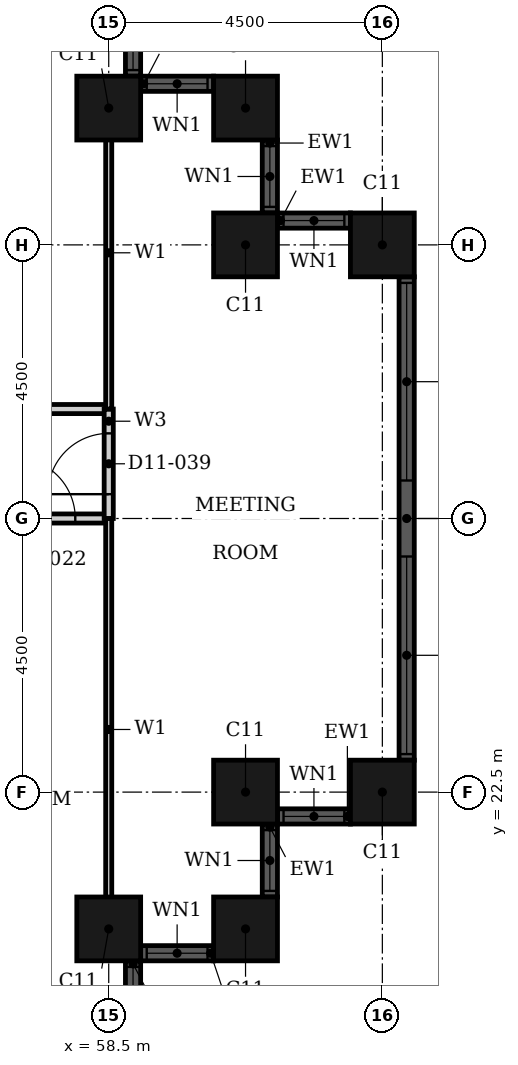
"""IFC4 building model, lengths in metres.
Left out: names, types, materials, properties, quantities, classifications, styles, units other than length and angle.
Written with IfcOpenShell. Run it as: python <this file> out.ifc"""

import sys

from ifc_helpers import new_model, si_unit, direction, frame, frame_2d, origin, origin_2d, place, context, subcontext, project, spatial, rectangle, hollow_rectangle, extrude, element, fill, save


model = new_model("IFC4")
c1 = context("Model", 3, precision=1e-05, world=origin(), true_north=direction((0.0, 1.0)))
c2 = subcontext(c1, "Body", "Model", "MODEL_VIEW")
j1 = project(units=[si_unit("LENGTHUNIT", "METRE"), si_unit("PLANEANGLEUNIT", "RADIAN")], contexts=[c1])
p1 = place(None, origin())
s1 = spatial("IfcSite", under=j1, at=p1, CompositionType="ELEMENT")
p2 = place(p1, origin())
s2 = spatial("IfcBuilding", under=s1, at=p2, CompositionType="ELEMENT")
p3 = place(p2, frame((0.0, 0.0, 52.8)))
s3 = spatial("IfcBuildingStorey", under=s2, at=p3, CompositionType="ELEMENT", Elevation=52.8)
for number, where, z_axis, x_axis in (
    (1, (58.5, 20.25, 0.0), (0.0, 0.0, 1.0), (1.0, 0.0, 0.0)),
    (2, (60.75, 20.25, 0.0), (0.0, 0.0, 1.0), (1.0, 0.0, 0.0)),
    (3, (60.75, 22.5, 0.0), (0.0, 0.0, 1.0), (1.0, 0.0, 0.0)),
    (4, (63.0, 22.5, 0.0), (0.0, 0.0, 1.0), (1.0, 0.0, 0.0)),
    (5, (63.0, 31.5, 0.0), (0.0, 0.0, 1.0), (1.0, 0.0, 0.0)),
    (6, (60.75, 31.5, 0.0), (0.0, 0.0, 1.0), (1.0, 0.0, 0.0)),
    (7, (60.75, 33.75, 0.0), (0.0, 0.0, 1.0), (1.0, 0.0, 0.0)),
    (8, (58.5, 33.75, 0.0), (0.0, 0.0, 1.0), (1.0, 0.0, 0.0)),
):
    element("IfcColumn", number, at=place(p3, frame(where, z_axis=z_axis, x_axis=x_axis)), inside=s3, PredefinedType="COLUMN", context=c2, shape_type="SweptSolid", body=[
        extrude(hollow_rectangle(XDim=1.05, YDim=1.05, WallThickness=0.034, at=origin_2d()), origin(), (0.0, 0.0, 1.0), 3.6),
    ])
p4 = place(p3, frame((58.9, 18.525, 0.0), z_axis=(0.0, 0.0, 1.0), x_axis=(0.0, 1.0, 0.0)))
e9 = element("IfcWall", 9, at=p4, inside=s3, PredefinedType="SOLIDWALL", context=c2, shape_type="SweptSolid", body=[
    extrude(rectangle(XDim=1.2, YDim=0.25, at=frame_2d((0.6, 0.0))), origin(), (0.0, 0.0, 1.0), 3.6),
])
p5 = place(p4, frame((0.1, 0.0, 0.9)))
e10 = element("IfcOpeningElement", 10, at=p5, cuts=e9, PredefinedType="OPENING", context=c2, shape_type="SweptSolid", body=[
    extrude(rectangle(XDim=1.0, YDim=2.08, at=frame_2d((0.5, 1.04))), frame((0.0, 0.135, 0.0), z_axis=(0.0, -1.0, 0.0), x_axis=(1.0, 0.0, 0.0)), (0.0, 0.0, 1.0), 0.27),
])
p6 = place(p3, frame((59.025, 19.85, 0.0), z_axis=(0.0, 0.0, 1.0), x_axis=(1.0, 0.0, 0.0)))
e11 = element("IfcWall", 11, at=p6, inside=s3, PredefinedType="SOLIDWALL", context=c2, shape_type="SweptSolid", body=[
    extrude(rectangle(XDim=1.2, YDim=0.25, at=frame_2d((0.6, 0.0))), origin(), (0.0, 0.0, 1.0), 3.6),
])
p7 = place(p6, frame((0.1, 0.0, 0.9)))
e12 = element("IfcOpeningElement", 12, at=p7, cuts=e11, PredefinedType="OPENING", context=c2, shape_type="SweptSolid", body=[
    extrude(rectangle(XDim=1.0, YDim=2.08, at=frame_2d((0.5, 1.04))), frame((0.0, 0.135, 0.0), z_axis=(0.0, -1.0, 0.0), x_axis=(1.0, 0.0, 0.0)), (0.0, 0.0, 1.0), 0.27),
])
p8 = place(p3, frame((61.15, 20.775, 0.0), z_axis=(0.0, 0.0, 1.0), x_axis=(0.0, 1.0, 0.0)))
e13 = element("IfcWall", 13, at=p8, inside=s3, PredefinedType="SOLIDWALL", context=c2, shape_type="SweptSolid", body=[
    extrude(rectangle(XDim=1.2, YDim=0.25, at=frame_2d((0.6, 0.0))), origin(), (0.0, 0.0, 1.0), 3.6),
])
p9 = place(p8, frame((0.1, 0.0, 0.9)))
e14 = element("IfcOpeningElement", 14, at=p9, cuts=e13, PredefinedType="OPENING", context=c2, shape_type="SweptSolid", body=[
    extrude(rectangle(XDim=1.0, YDim=2.08, at=frame_2d((0.5, 1.04))), frame((0.0, 0.135, 0.0), z_axis=(0.0, -1.0, 0.0), x_axis=(1.0, 0.0, 0.0)), (0.0, 0.0, 1.0), 0.27),
])
p10 = place(p3, frame((61.275, 22.1, 0.0), z_axis=(0.0, 0.0, 1.0), x_axis=(1.0, 0.0, 0.0)))
e15 = element("IfcWall", 15, at=p10, inside=s3, PredefinedType="SOLIDWALL", context=c2, shape_type="SweptSolid", body=[
    extrude(rectangle(XDim=1.2, YDim=0.25, at=frame_2d((0.6, 0.0))), origin(), (0.0, 0.0, 1.0), 3.6),
])
p11 = place(p10, frame((0.1, 0.0, 0.9)))
e16 = element("IfcOpeningElement", 16, at=p11, cuts=e15, PredefinedType="OPENING", context=c2, shape_type="SweptSolid", body=[
    extrude(rectangle(XDim=1.0, YDim=2.08, at=frame_2d((0.5, 1.04))), frame((0.0, 0.135, 0.0), z_axis=(0.0, -1.0, 0.0), x_axis=(1.0, 0.0, 0.0)), (0.0, 0.0, 1.0), 0.27),
])
p12 = place(p3, frame((63.4, 23.025, 0.0), z_axis=(0.0, 0.0, 1.0), x_axis=(0.0, 1.0, 0.0)))
e17 = element("IfcWall", 17, at=p12, inside=s3, PredefinedType="SOLIDWALL", context=c2, shape_type="SweptSolid", body=[
    extrude(rectangle(XDim=7.95, YDim=0.25, at=frame_2d((3.975, 0.0))), origin(), (0.0, 0.0, 1.0), 3.6),
])
p13 = place(p12, frame((0.1, 0.0, 0.9)))
e18 = element("IfcOpeningElement", 18, at=p13, cuts=e17, PredefinedType="OPENING", context=c2, shape_type="SweptSolid", body=[
    extrude(rectangle(XDim=3.25, YDim=2.08, at=frame_2d((1.625, 1.04))), frame((0.0, 0.135, 0.0), z_axis=(0.0, -1.0, 0.0), x_axis=(1.0, 0.0, 0.0)), (0.0, 0.0, 1.0), 0.27),
])
p14 = place(p12, frame((4.6, 0.0, 0.9)))
e19 = element("IfcOpeningElement", 19, at=p14, cuts=e17, PredefinedType="OPENING", context=c2, shape_type="SweptSolid", body=[
    extrude(rectangle(XDim=3.25, YDim=2.08, at=frame_2d((1.625, 1.04))), frame((0.0, 0.135, 0.0), z_axis=(0.0, -1.0, 0.0), x_axis=(1.0, 0.0, 0.0)), (0.0, 0.0, 1.0), 0.27),
])
p15 = place(p3, frame((62.475, 31.9, 0.0), z_axis=(0.0, 0.0, 1.0), x_axis=(-1.0, 0.0, 0.0)))
e20 = element("IfcWall", 20, at=p15, inside=s3, PredefinedType="SOLIDWALL", context=c2, shape_type="SweptSolid", body=[
    extrude(rectangle(XDim=1.2, YDim=0.25, at=frame_2d((0.6, 0.0))), origin(), (0.0, 0.0, 1.0), 3.6),
])
p16 = place(p15, frame((0.1, 0.0, 0.9)))
e21 = element("IfcOpeningElement", 21, at=p16, cuts=e20, PredefinedType="OPENING", context=c2, shape_type="SweptSolid", body=[
    extrude(rectangle(XDim=1.0, YDim=2.08, at=frame_2d((0.5, 1.04))), frame((0.0, 0.135, 0.0), z_axis=(0.0, -1.0, 0.0), x_axis=(1.0, 0.0, 0.0)), (0.0, 0.0, 1.0), 0.27),
])
p17 = place(p3, frame((61.15, 32.025, 0.0), z_axis=(0.0, 0.0, 1.0), x_axis=(0.0, 1.0, 0.0)))
e22 = element("IfcWall", 22, at=p17, inside=s3, PredefinedType="SOLIDWALL", context=c2, shape_type="SweptSolid", body=[
    extrude(rectangle(XDim=1.2, YDim=0.25, at=frame_2d((0.6, 0.0))), origin(), (0.0, 0.0, 1.0), 3.6),
])
p18 = place(p17, frame((0.1, 0.0, 0.9)))
e23 = element("IfcOpeningElement", 23, at=p18, cuts=e22, PredefinedType="OPENING", context=c2, shape_type="SweptSolid", body=[
    extrude(rectangle(XDim=1.0, YDim=2.08, at=frame_2d((0.5, 1.04))), frame((0.0, 0.135, 0.0), z_axis=(0.0, -1.0, 0.0), x_axis=(1.0, 0.0, 0.0)), (0.0, 0.0, 1.0), 0.27),
])
p19 = place(p3, frame((60.225, 34.15, 0.0), z_axis=(0.0, 0.0, 1.0), x_axis=(-1.0, 0.0, 0.0)))
e24 = element("IfcWall", 24, at=p19, inside=s3, PredefinedType="SOLIDWALL", context=c2, shape_type="SweptSolid", body=[
    extrude(rectangle(XDim=1.2, YDim=0.25, at=frame_2d((0.6, 0.0))), origin(), (0.0, 0.0, 1.0), 3.6),
])
p20 = place(p19, frame((0.1, 0.0, 0.9)))
e25 = element("IfcOpeningElement", 25, at=p20, cuts=e24, PredefinedType="OPENING", context=c2, shape_type="SweptSolid", body=[
    extrude(rectangle(XDim=1.0, YDim=2.08, at=frame_2d((0.5, 1.04))), frame((0.0, 0.135, 0.0), z_axis=(0.0, -1.0, 0.0), x_axis=(1.0, 0.0, 0.0)), (0.0, 0.0, 1.0), 0.27),
])
p21 = place(p3, frame((58.9, 34.275, 0.0), z_axis=(0.0, 0.0, 1.0), x_axis=(0.0, 1.0, 0.0)))
e26 = element("IfcWall", 26, at=p21, inside=s3, PredefinedType="SOLIDWALL", context=c2, shape_type="SweptSolid", body=[
    extrude(rectangle(XDim=1.2, YDim=0.25, at=frame_2d((0.6, 0.0))), origin(), (0.0, 0.0, 1.0), 3.6),
])
p22 = place(p21, frame((0.1, 0.0, 0.9)))
e27 = element("IfcOpeningElement", 27, at=p22, cuts=e26, PredefinedType="OPENING", context=c2, shape_type="SweptSolid", body=[
    extrude(rectangle(XDim=1.0, YDim=2.08, at=frame_2d((0.5, 1.04))), frame((0.0, 0.135, 0.0), z_axis=(0.0, -1.0, 0.0), x_axis=(1.0, 0.0, 0.0)), (0.0, 0.0, 1.0), 0.27),
])
p23 = place(p3, frame((46.8, 27.0, 0.0), z_axis=(0.0, 0.0, 1.0), x_axis=(1.0, 0.0, 0.0)))
e28 = element("IfcWall", 28, at=p23, inside=s3, PredefinedType="PARTITIONING", context=c2, shape_type="SweptSolid", body=[
    extrude(rectangle(XDim=11.7, YDim=0.15, at=frame_2d((5.85, 0.0))), origin(), (0.0, 0.0, 1.0), 2.58),
])
p24 = place(p23, frame((5.65, 0.0, 0.0)))
e29 = element("IfcOpeningElement", 29, at=p24, cuts=e28, PredefinedType="OPENING", context=c2, shape_type="SweptSolid", body=[
    extrude(rectangle(XDim=1.0, YDim=2.1, at=frame_2d((0.5, 1.05))), frame((0.0, 0.085, 0.0), z_axis=(0.0, -1.0, 0.0), x_axis=(1.0, 0.0, 0.0)), (0.0, 0.0, 1.0), 0.17),
])
p25 = place(p23, frame((10.15, 0.0, 0.0)))
e30 = element("IfcOpeningElement", 30, at=p25, cuts=e28, PredefinedType="OPENING", context=c2, shape_type="SweptSolid", body=[
    extrude(rectangle(XDim=1.0, YDim=2.1, at=frame_2d((0.5, 1.05))), frame((0.0, 0.085, 0.0), z_axis=(0.0, -1.0, 0.0), x_axis=(1.0, 0.0, 0.0)), (0.0, 0.0, 1.0), 0.17),
])
p26 = place(p3, frame((46.8, 28.8, 0.0), z_axis=(0.0, 0.0, 1.0), x_axis=(1.0, 0.0, 0.0)))
e31 = element("IfcWall", 31, at=p26, inside=s3, PredefinedType="PARTITIONING", context=c2, shape_type="SweptSolid", body=[
    extrude(rectangle(XDim=11.7, YDim=0.15, at=frame_2d((5.85, 0.0))), origin(), (0.0, 0.0, 1.0), 3.3),
])
p27 = place(p26, frame((4.45, 0.0, 0.0)))
e32 = element("IfcOpeningElement", 32, at=p27, cuts=e31, PredefinedType="OPENING", context=c2, shape_type="SweptSolid", body=[
    extrude(rectangle(XDim=1.0, YDim=2.1, at=frame_2d((0.5, 1.05))), frame((0.0, 0.085, 0.0), z_axis=(0.0, -1.0, 0.0), x_axis=(1.0, 0.0, 0.0)), (0.0, 0.0, 1.0), 0.17),
])
p28 = place(p3, frame((58.5, 27.0, 0.0), z_axis=(0.0, 0.0, 1.0), x_axis=(0.0, 1.0, 0.0)))
e33 = element("IfcWall", 33, at=p28, inside=s3, PredefinedType="PARTITIONING", context=c2, shape_type="SweptSolid", body=[
    extrude(rectangle(XDim=1.8, YDim=0.15, at=frame_2d((0.9, 0.0))), origin(), (0.0, 0.0, 1.0), 3.3),
])
p29 = place(p28, frame((0.4, 0.0, 0.0)))
e34 = element("IfcOpeningElement", 34, at=p29, cuts=e33, PredefinedType="OPENING", context=c2, shape_type="SweptSolid", body=[
    extrude(rectangle(XDim=1.0, YDim=2.1, at=frame_2d((0.5, 1.05))), frame((0.0, 0.085, 0.0), z_axis=(0.0, -1.0, 0.0), x_axis=(1.0, 0.0, 0.0)), (0.0, 0.0, 1.0), 0.17),
])
p30 = place(p3, frame((58.5, 20.06, 0.0), z_axis=(0.0, 0.0, 1.0), x_axis=(0.0, 1.0, 0.0)))
e35 = element("IfcWall", 35, at=p30, inside=s3, PredefinedType="PARTITIONING", context=c2, shape_type="SweptSolid", body=[
    extrude(rectangle(XDim=6.94, YDim=0.1, at=frame_2d((3.47, 0.0))), origin(), (0.0, 0.0, 1.0), 3.3),
])
p31 = place(p3, frame((58.5, 28.8, 0.0), z_axis=(0.0, 0.0, 1.0), x_axis=(0.0, 1.0, 0.0)))
e36 = element("IfcWall", 36, at=p31, inside=s3, PredefinedType="PARTITIONING", context=c2, shape_type="SweptSolid", body=[
    extrude(rectangle(XDim=5.14, YDim=0.1, at=frame_2d((2.57, 0.0))), origin(), (0.0, 0.0, 1.0), 3.3),
])
p32 = place(p5, origin())
e37 = element("IfcWindow", 37, at=p32, inside=s3, PartitioningType="SINGLE_PANEL", PredefinedType="WINDOW", context=c2, shape_type="SweptSolid", body=[
    extrude(rectangle(XDim=1.0, YDim=2.08, at=frame_2d((0.5, 1.04))), frame((0.0, 0.03, 0.0), z_axis=(0.0, -1.0, 0.0), x_axis=(1.0, 0.0, 0.0)), (0.0, 0.0, 1.0), 0.06),
])
fill(e10, e37)
p33 = place(p7, origin())
e38 = element("IfcWindow", 38, at=p33, inside=s3, PartitioningType="SINGLE_PANEL", PredefinedType="WINDOW", context=c2, shape_type="SweptSolid", body=[
    extrude(rectangle(XDim=1.0, YDim=2.08, at=frame_2d((0.5, 1.04))), frame((0.0, 0.03, 0.0), z_axis=(0.0, -1.0, 0.0), x_axis=(1.0, 0.0, 0.0)), (0.0, 0.0, 1.0), 0.06),
])
fill(e12, e38)
p34 = place(p9, origin())
e39 = element("IfcWindow", 39, at=p34, inside=s3, PartitioningType="SINGLE_PANEL", PredefinedType="WINDOW", context=c2, shape_type="SweptSolid", body=[
    extrude(rectangle(XDim=1.0, YDim=2.08, at=frame_2d((0.5, 1.04))), frame((0.0, 0.03, 0.0), z_axis=(0.0, -1.0, 0.0), x_axis=(1.0, 0.0, 0.0)), (0.0, 0.0, 1.0), 0.06),
])
fill(e14, e39)
p35 = place(p11, origin())
e40 = element("IfcWindow", 40, at=p35, inside=s3, PartitioningType="SINGLE_PANEL", PredefinedType="WINDOW", context=c2, shape_type="SweptSolid", body=[
    extrude(rectangle(XDim=1.0, YDim=2.08, at=frame_2d((0.5, 1.04))), frame((0.0, 0.03, 0.0), z_axis=(0.0, -1.0, 0.0), x_axis=(1.0, 0.0, 0.0)), (0.0, 0.0, 1.0), 0.06),
])
fill(e16, e40)
p36 = place(p13, origin())
e41 = element("IfcWindow", 41, at=p36, inside=s3, PartitioningType="SINGLE_PANEL", PredefinedType="WINDOW", context=c2, shape_type="SweptSolid", body=[
    extrude(rectangle(XDim=3.25, YDim=2.08, at=frame_2d((1.625, 1.04))), frame((0.0, 0.03, 0.0), z_axis=(0.0, -1.0, 0.0), x_axis=(1.0, 0.0, 0.0)), (0.0, 0.0, 1.0), 0.06),
])
fill(e18, e41)
p37 = place(p14, origin())
e42 = element("IfcWindow", 42, at=p37, inside=s3, PartitioningType="SINGLE_PANEL", PredefinedType="WINDOW", context=c2, shape_type="SweptSolid", body=[
    extrude(rectangle(XDim=3.25, YDim=2.08, at=frame_2d((1.625, 1.04))), frame((0.0, 0.03, 0.0), z_axis=(0.0, -1.0, 0.0), x_axis=(1.0, 0.0, 0.0)), (0.0, 0.0, 1.0), 0.06),
])
fill(e19, e42)
p38 = place(p16, origin())
e43 = element("IfcWindow", 43, at=p38, inside=s3, PartitioningType="SINGLE_PANEL", PredefinedType="WINDOW", context=c2, shape_type="SweptSolid", body=[
    extrude(rectangle(XDim=1.0, YDim=2.08, at=frame_2d((0.5, 1.04))), frame((0.0, 0.03, 0.0), z_axis=(0.0, -1.0, 0.0), x_axis=(1.0, 0.0, 0.0)), (0.0, 0.0, 1.0), 0.06),
])
fill(e21, e43)
p39 = place(p18, origin())
e44 = element("IfcWindow", 44, at=p39, inside=s3, PartitioningType="SINGLE_PANEL", PredefinedType="WINDOW", context=c2, shape_type="SweptSolid", body=[
    extrude(rectangle(XDim=1.0, YDim=2.08, at=frame_2d((0.5, 1.04))), frame((0.0, 0.03, 0.0), z_axis=(0.0, -1.0, 0.0), x_axis=(1.0, 0.0, 0.0)), (0.0, 0.0, 1.0), 0.06),
])
fill(e23, e44)
p40 = place(p20, origin())
e45 = element("IfcWindow", 45, at=p40, inside=s3, PartitioningType="SINGLE_PANEL", PredefinedType="WINDOW", context=c2, shape_type="SweptSolid", body=[
    extrude(rectangle(XDim=1.0, YDim=2.08, at=frame_2d((0.5, 1.04))), frame((0.0, 0.03, 0.0), z_axis=(0.0, -1.0, 0.0), x_axis=(1.0, 0.0, 0.0)), (0.0, 0.0, 1.0), 0.06),
])
fill(e25, e45)
p41 = place(p22, origin())
e46 = element("IfcWindow", 46, at=p41, inside=s3, PartitioningType="SINGLE_PANEL", PredefinedType="WINDOW", context=c2, shape_type="SweptSolid", body=[
    extrude(rectangle(XDim=1.0, YDim=2.08, at=frame_2d((0.5, 1.04))), frame((0.0, 0.03, 0.0), z_axis=(0.0, -1.0, 0.0), x_axis=(1.0, 0.0, 0.0)), (0.0, 0.0, 1.0), 0.06),
])
fill(e27, e46)
p42 = place(p25, origin())
e47 = element("IfcDoor", 47, at=p42, inside=s3, OperationType="SINGLE_SWING_RIGHT", PredefinedType="DOOR", context=c2, shape_type="SweptSolid", body=[
    extrude(rectangle(XDim=1.0, YDim=2.1, at=frame_2d((0.5, 1.05))), frame((0.0, 0.025, 0.0), z_axis=(0.0, -1.0, 0.0), x_axis=(1.0, 0.0, 0.0)), (0.0, 0.0, 1.0), 0.05),
])
fill(e30, e47)
p43 = place(p29, origin())
e48 = element("IfcDoor", 48, at=p43, inside=s3, OperationType="SINGLE_SWING_LEFT", PredefinedType="DOOR", context=c2, shape_type="SweptSolid", body=[
    extrude(rectangle(XDim=1.0, YDim=2.1, at=frame_2d((0.5, 1.05))), frame((0.0, 0.025, 0.0), z_axis=(0.0, -1.0, 0.0), x_axis=(1.0, 0.0, 0.0)), (0.0, 0.0, 1.0), 0.05),
])
fill(e34, e48)
save(model, sys.argv[1])
